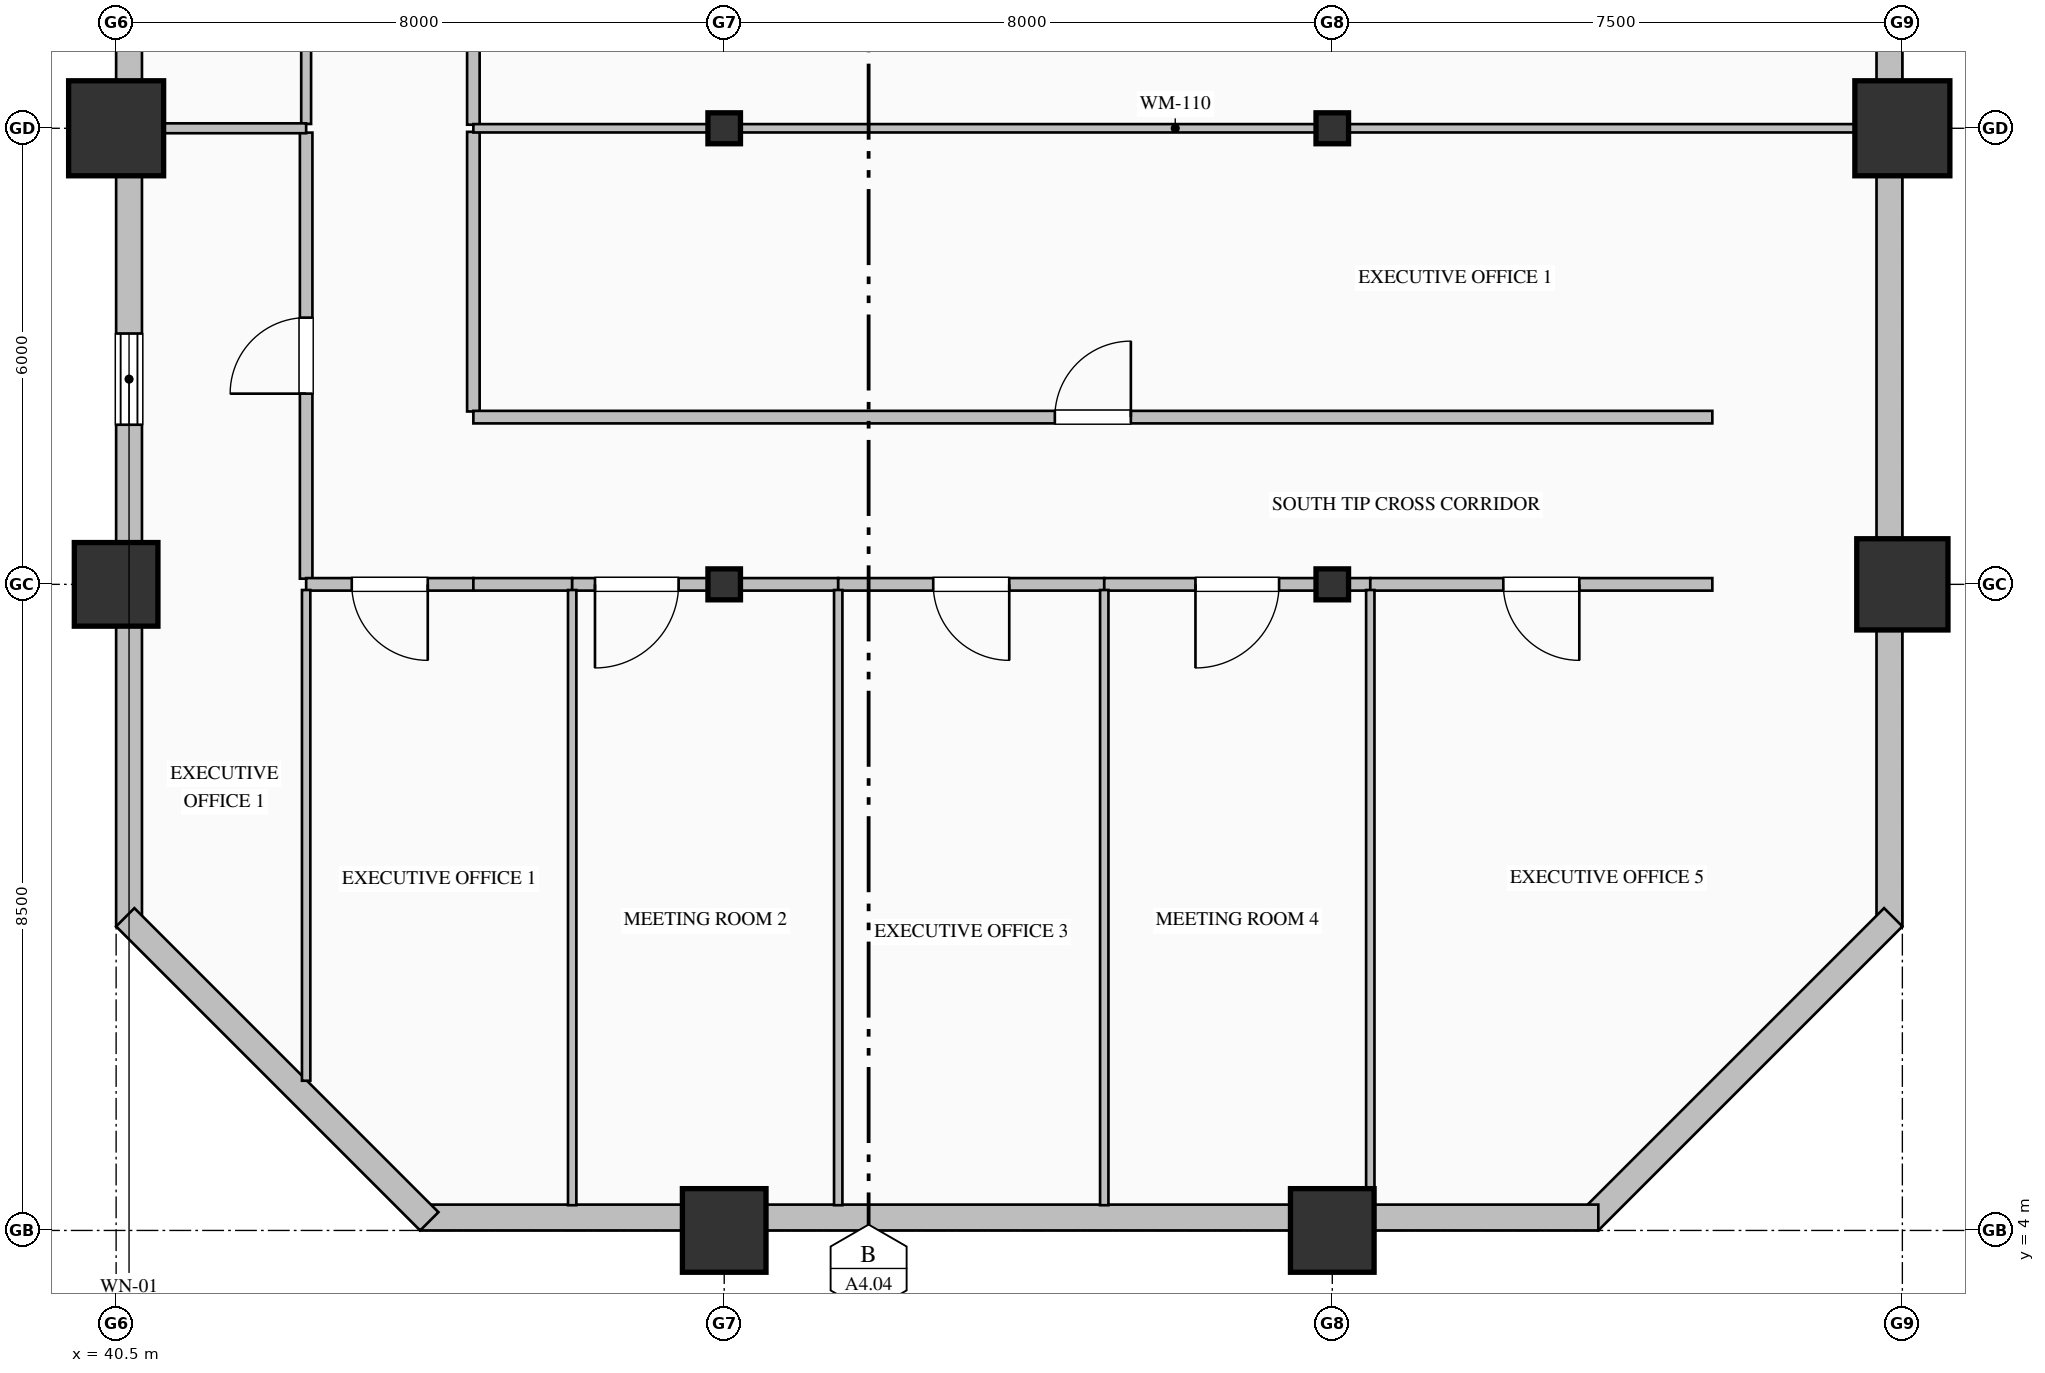
"""IFC4 building model, lengths in metres.
Left out: names, types, materials, properties, quantities, classifications, styles, units other than length and angle.
Written with IfcOpenShell. Run it as: python <this file> out.ifc"""

import sys

from ifc_helpers import new_model, si_unit, direction, frame, frame_2d, origin, origin_2d, place, context, subcontext, project, spatial, rectangle, hollow_rectangle, hollow_circle, i_section, extrude, element, fill, save


model = new_model("IFC4")
c1 = context("Model", 3, precision=1e-05, world=origin(), true_north=direction((0.0, 1.0)))
c2 = subcontext(c1, "Body", "Model", "MODEL_VIEW")
j1 = project(units=[si_unit("LENGTHUNIT", "METRE"), si_unit("PLANEANGLEUNIT", "RADIAN")], contexts=[c1])
p1 = place(None, origin())
s1 = spatial("IfcSite", under=j1, at=p1, CompositionType="ELEMENT")
p2 = place(p1, origin())
s2 = spatial("IfcBuilding", under=s1, at=p2, CompositionType="ELEMENT")
p3 = place(p2, frame((0.0, 0.0, 40.2)))
s3 = spatial("IfcBuildingStorey", under=s2, at=p3, CompositionType="ELEMENT", Elevation=40.2)
p4 = place(p3, frame((40.5, 12.5, 0.0), z_axis=(0.0, 0.0, 1.0), x_axis=(1.0, 0.0, 0.0)))
e1 = element("IfcColumn", 1, at=p4, inside=s3, PredefinedType="COLUMN", context=c2, shape_type="SweptSolid", body=[
    extrude(hollow_rectangle(XDim=1.1, YDim=1.1, WallThickness=0.04, at=origin_2d()), origin(), (0.0, 0.0, 1.0), 4.0),
])
p5 = place(p3, frame((40.5, 18.5, 0.0), z_axis=(0.0, 0.0, 1.0), x_axis=(1.0, 0.0, 0.0)))
e2 = element("IfcColumn", 2, at=p5, inside=s3, PredefinedType="COLUMN", context=c2, shape_type="SweptSolid", body=[
    extrude(hollow_rectangle(XDim=1.25, YDim=1.25, WallThickness=0.045, at=origin_2d()), origin(), (0.0, 0.0, 1.0), 4.0),
])
p6 = place(p3, frame((48.5, 4.0, 0.0), z_axis=(0.0, 0.0, 1.0), x_axis=(1.0, 0.0, 0.0)))
e3 = element("IfcColumn", 3, at=p6, inside=s3, PredefinedType="COLUMN", context=c2, shape_type="SweptSolid", body=[
    extrude(hollow_rectangle(XDim=1.1, YDim=1.1, WallThickness=0.04, at=origin_2d()), origin(), (0.0, 0.0, 1.0), 4.0),
])
for number, where, z_axis, x_axis in (
    (4, (48.5, 12.5, 0.0), (0.0, 0.0, 1.0), (1.0, 0.0, 0.0)),
    (5, (48.5, 18.5, 0.0), (0.0, 0.0, 1.0), (1.0, 0.0, 0.0)),
):
    element("IfcColumn", number, at=place(p3, frame(where, z_axis=z_axis, x_axis=x_axis)), inside=s3, PredefinedType="COLUMN", context=c2, shape_type="SweptSolid", body=[
        extrude(i_section(OverallWidth=0.407, OverallDepth=0.428, WebThickness=0.02, FlangeThickness=0.035, FilletRadius=0.022, at=origin_2d()), origin(), (0.0, 0.0, 1.0), 4.0),
    ])
p7 = place(p3, frame((56.5, 4.0, 0.0), z_axis=(0.0, 0.0, 1.0), x_axis=(1.0, 0.0, 0.0)))
e6 = element("IfcColumn", 6, at=p7, inside=s3, PredefinedType="COLUMN", context=c2, shape_type="SweptSolid", body=[
    extrude(hollow_rectangle(XDim=1.1, YDim=1.1, WallThickness=0.04, at=origin_2d()), origin(), (0.0, 0.0, 1.0), 4.0),
])
for number, where, z_axis, x_axis in (
    (7, (56.5, 12.5, 0.0), (0.0, 0.0, 1.0), (1.0, 0.0, 0.0)),
    (8, (56.5, 18.5, 0.0), (0.0, 0.0, 1.0), (1.0, 0.0, 0.0)),
):
    element("IfcColumn", number, at=place(p3, frame(where, z_axis=z_axis, x_axis=x_axis)), inside=s3, PredefinedType="COLUMN", context=c2, shape_type="SweptSolid", body=[
        extrude(i_section(OverallWidth=0.407, OverallDepth=0.428, WebThickness=0.02, FlangeThickness=0.035, FilletRadius=0.022, at=origin_2d()), origin(), (0.0, 0.0, 1.0), 4.0),
    ])
p8 = place(p3, frame((64.0, 12.5, 0.0), z_axis=(0.0, 0.0, 1.0), x_axis=(1.0, 0.0, 0.0)))
e9 = element("IfcColumn", 9, at=p8, inside=s3, PredefinedType="COLUMN", context=c2, shape_type="SweptSolid", body=[
    extrude(hollow_circle(Radius=0.6, WallThickness=0.04, at=origin_2d()), origin(), (0.0, 0.0, 1.0), 4.0),
])
p9 = place(p3, frame((64.0, 18.5, 0.0), z_axis=(0.0, 0.0, 1.0), x_axis=(1.0, 0.0, 0.0)))
e10 = element("IfcColumn", 10, at=p9, inside=s3, PredefinedType="COLUMN", context=c2, shape_type="SweptSolid", body=[
    extrude(hollow_rectangle(XDim=1.25, YDim=1.25, WallThickness=0.045, at=origin_2d()), origin(), (0.0, 0.0, 1.0), 4.0),
])
p10 = place(p3, frame((40.67, 8.0, 0.0), z_axis=(0.0, 0.0, 1.0), x_axis=(0.0, 1.0, 0.0)))
e11 = element("IfcWall", 11, at=p10, inside=s3, PredefinedType="SOLIDWALL", context=c2, shape_type="SweptSolid", body=[
    extrude(rectangle(XDim=20.34, YDim=0.34, at=frame_2d((10.17, 0.0))), origin(), (0.0, 0.0, 1.0), 3.05),
])
p11 = place(p10, frame((6.6, 0.0, 0.7)))
e12 = element("IfcOpeningElement", 12, at=p11, cuts=e11, PredefinedType="OPENING", context=c2, shape_type="SweptSolid", body=[
    extrude(rectangle(XDim=1.2, YDim=1.85, at=frame_2d((0.6, 0.925))), frame((0.0, 0.18, 0.0), z_axis=(0.0, -1.0, 0.0), x_axis=(1.0, 0.0, 0.0)), (0.0, 0.0, 1.0), 0.36),
])
p12 = place(p10, frame((13.8, 0.0, 0.7)))
e13 = element("IfcOpeningElement", 13, at=p12, cuts=e11, PredefinedType="OPENING", context=c2, shape_type="SweptSolid", body=[
    extrude(rectangle(XDim=1.2, YDim=1.85, at=frame_2d((0.6, 0.925))), frame((0.0, 0.18, 0.0), z_axis=(0.0, -1.0, 0.0), x_axis=(1.0, 0.0, 0.0)), (0.0, 0.0, 1.0), 0.36),
])
p13 = place(p3, frame((63.83, 36.05, 0.0), z_axis=(0.0, 0.0, 1.0), x_axis=(0.0, -1.0, 0.0)))
e14 = element("IfcWall", 14, at=p13, inside=s3, PredefinedType="SOLIDWALL", context=c2, shape_type="SweptSolid", body=[
    extrude(rectangle(XDim=28.05, YDim=0.34, at=frame_2d((14.025, 0.0))), origin(), (0.0, 0.0, 1.0), 3.25),
])
p14 = place(p13, frame((9.6, 0.0, 0.8)))
e15 = element("IfcOpeningElement", 15, at=p14, cuts=e14, PredefinedType="OPENING", context=c2, shape_type="SweptSolid", body=[
    extrude(rectangle(XDim=2.4, YDim=2.15, at=frame_2d((1.2, 1.075))), frame((0.0, 0.18, 0.0), z_axis=(0.0, -1.0, 0.0), x_axis=(1.0, 0.0, 0.0)), (0.0, 0.0, 1.0), 0.36),
])
p15 = place(p13, frame((13.5, 0.0, 0.85)))
e16 = element("IfcOpeningElement", 16, at=p15, cuts=e14, PredefinedType="OPENING", context=c2, shape_type="SweptSolid", body=[
    extrude(rectangle(XDim=1.8, YDim=2.05, at=frame_2d((0.9, 1.025))), frame((0.0, 0.18, 0.0), z_axis=(0.0, -1.0, 0.0), x_axis=(1.0, 0.0, 0.0)), (0.0, 0.0, 1.0), 0.36),
])
p16 = place(p3, frame((63.88, 8.12, 0.0), z_axis=(0.0, 0.0, 1.0), x_axis=(-0.707106781187, -0.707106781187, 0.0)))
e17 = element("IfcWall", 17, at=p16, inside=s3, PredefinedType="SOLIDWALL", context=c2, shape_type="SweptSolid", body=[
    extrude(rectangle(XDim=5.657, YDim=0.34, at=frame_2d((2.828, 0.0))), origin(), (0.0, 0.0, 1.0), 3.75),
])
p17 = place(p3, frame((60.0, 4.17, 0.0), z_axis=(0.0, 0.0, 1.0), x_axis=(-1.0, 0.0, 0.0)))
e18 = element("IfcWall", 18, at=p17, inside=s3, PredefinedType="SOLIDWALL", context=c2, shape_type="SweptSolid", body=[
    extrude(rectangle(XDim=15.5, YDim=0.34, at=frame_2d((7.75, 0.0))), origin(), (0.0, 0.0, 1.0), 3.25),
])
p18 = place(p3, frame((44.62, 4.12, 0.0), z_axis=(0.0, 0.0, 1.0), x_axis=(-0.707106781187, 0.707106781187, 0.0)))
e19 = element("IfcWall", 19, at=p18, inside=s3, PredefinedType="SOLIDWALL", context=c2, shape_type="SweptSolid", body=[
    extrude(rectangle(XDim=5.657, YDim=0.34, at=frame_2d((2.828, 0.0))), origin(), (0.0, 0.0, 1.0), 3.75),
])
p19 = place(p3, frame((45.2, 18.453, 0.0), z_axis=(0.0, 0.0, 1.0), x_axis=(0.0, -1.0, 0.0)))
e20 = element("IfcWall", 20, at=p19, inside=s3, PredefinedType="PARTITIONING", context=c2, shape_type="SweptSolid", body=[
    extrude(rectangle(XDim=3.678, YDim=0.165, at=frame_2d((1.839, 0.0))), origin(), (0.0, 0.0, 1.0), 3.75),
])
p20 = place(p3, frame((45.2, 23.153, 0.0), z_axis=(0.0, 0.0, 1.0), x_axis=(0.0, -1.0, 0.0)))
e21 = element("IfcWall", 21, at=p20, inside=s3, PredefinedType="PARTITIONING", context=c2, shape_type="SweptSolid", body=[
    extrude(rectangle(XDim=4.606, YDim=0.165, at=frame_2d((2.303, 0.0))), origin(), (0.0, 0.0, 1.0), 3.75),
])
p21 = place(p20, frame((1.753, 0.0, 0.0)))
e22 = element("IfcOpeningElement", 22, at=p21, cuts=e21, PredefinedType="OPENING", context=c2, shape_type="SweptSolid", body=[
    extrude(rectangle(XDim=1.1, YDim=2.2, at=frame_2d((0.55, 1.1))), frame((0.0, 0.093, 0.0), z_axis=(0.0, -1.0, 0.0), x_axis=(1.0, 0.0, 0.0)), (0.0, 0.0, 1.0), 0.185),
])
p22 = place(p3, frame((43.0, 12.574, 0.0), z_axis=(0.0, 0.0, 1.0), x_axis=(0.0, 1.0, 0.0)))
e23 = element("IfcWall", 23, at=p22, inside=s3, PredefinedType="PARTITIONING", context=c2, shape_type="SweptSolid", body=[
    extrude(rectangle(XDim=5.869, YDim=0.165, at=frame_2d((2.934, 0.0))), origin(), (0.0, 0.0, 1.0), 3.75),
])
p23 = place(p22, frame((2.434, 0.0, 0.0)))
e24 = element("IfcOpeningElement", 24, at=p23, cuts=e23, PredefinedType="OPENING", context=c2, shape_type="SweptSolid", body=[
    extrude(rectangle(XDim=1.0, YDim=2.15, at=frame_2d((0.5, 1.075))), frame((0.0, 0.093, 0.0), z_axis=(0.0, -1.0, 0.0), x_axis=(1.0, 0.0, 0.0)), (0.0, 0.0, 1.0), 0.185),
])
p24 = place(p3, frame((43.0, 18.557, 0.0), z_axis=(0.0, 0.0, 1.0), x_axis=(0.0, 1.0, 0.0)))
e25 = element("IfcWall", 25, at=p24, inside=s3, PredefinedType="PARTITIONING", context=c2, shape_type="SweptSolid", body=[
    extrude(rectangle(XDim=5.886, YDim=0.13, at=frame_2d((2.943, 0.0))), origin(), (0.0, 0.0, 1.0), 3.75),
])
p25 = place(p24, frame((2.443, 0.0, 0.0)))
e26 = element("IfcOpeningElement", 26, at=p25, cuts=e25, PredefinedType="OPENING", context=c2, shape_type="SweptSolid", body=[
    extrude(rectangle(XDim=1.0, YDim=2.15, at=frame_2d((0.5, 1.075))), frame((0.0, 0.075, 0.0), z_axis=(0.0, -1.0, 0.0), x_axis=(1.0, 0.0, 0.0)), (0.0, 0.0, 1.0), 0.15),
])
p26 = place(p3, frame((45.2, 12.5, 0.0), z_axis=(0.0, 0.0, 1.0), x_axis=(-1.0, 0.0, 0.0)))
e27 = element("IfcWall", 27, at=p26, inside=s3, PredefinedType="PARTITIONING", context=c2, shape_type="SweptSolid", body=[
    extrude(rectangle(XDim=2.2, YDim=0.165, at=frame_2d((1.1, 0.0))), origin(), (0.0, 0.0, 1.0), 3.042),
])
p27 = place(p26, frame((0.6, 0.0, 0.0)))
e28 = element("IfcOpeningElement", 28, at=p27, cuts=e27, PredefinedType="OPENING", context=c2, shape_type="SweptSolid", body=[
    extrude(rectangle(XDim=1.0, YDim=2.15, at=frame_2d((0.5, 1.075))), frame((0.0, 0.093, 0.0), z_axis=(0.0, -1.0, 0.0), x_axis=(1.0, 0.0, 0.0)), (0.0, 0.0, 1.0), 0.185),
])
p28 = place(p3, frame((45.2, 14.7, 0.0), z_axis=(0.0, 0.0, 1.0), x_axis=(1.0, 0.0, 0.0)))
e29 = element("IfcWall", 29, at=p28, inside=s3, PredefinedType="PARTITIONING", context=c2, shape_type="SweptSolid", body=[
    extrude(rectangle(XDim=16.3, YDim=0.165, at=frame_2d((8.15, 0.0))), origin(), (0.0, 0.0, 1.0), 3.75),
])
p29 = place(p28, frame((7.65, 0.0, 0.0)))
e30 = element("IfcOpeningElement", 30, at=p29, cuts=e29, PredefinedType="OPENING", context=c2, shape_type="SweptSolid", body=[
    extrude(rectangle(XDim=1.0, YDim=2.15, at=frame_2d((0.5, 1.075))), frame((0.0, 0.093, 0.0), z_axis=(0.0, -1.0, 0.0), x_axis=(1.0, 0.0, 0.0)), (0.0, 0.0, 1.0), 0.185),
])
p30 = place(p3, frame((46.5, 12.5, 0.0), z_axis=(0.0, 0.0, 1.0), x_axis=(-1.0, 0.0, 0.0)))
e31 = element("IfcWall", 31, at=p30, inside=s3, PredefinedType="PARTITIONING", context=c2, shape_type="SweptSolid", body=[
    extrude(rectangle(XDim=1.3, YDim=0.165, at=frame_2d((0.65, 0.0))), origin(), (0.0, 0.0, 1.0), 3.042),
])
p31 = place(p3, frame((50.0, 12.5, 0.0), z_axis=(0.0, 0.0, 1.0), x_axis=(-1.0, 0.0, 0.0)))
e32 = element("IfcWall", 32, at=p31, inside=s3, PredefinedType="PARTITIONING", context=c2, shape_type="SweptSolid", body=[
    extrude(rectangle(XDim=3.5, YDim=0.165, at=frame_2d((1.75, 0.0))), origin(), (0.0, 0.0, 1.0), 3.042),
])
p32 = place(p31, frame((2.1, 0.0, 0.0)))
e33 = element("IfcOpeningElement", 33, at=p32, cuts=e32, PredefinedType="OPENING", context=c2, shape_type="SweptSolid", body=[
    extrude(rectangle(XDim=1.1, YDim=2.2, at=frame_2d((0.55, 1.1))), frame((0.0, 0.093, 0.0), z_axis=(0.0, -1.0, 0.0), x_axis=(1.0, 0.0, 0.0)), (0.0, 0.0, 1.0), 0.185),
])
p33 = place(p3, frame((53.5, 12.5, 0.0), z_axis=(0.0, 0.0, 1.0), x_axis=(-1.0, 0.0, 0.0)))
e34 = element("IfcWall", 34, at=p33, inside=s3, PredefinedType="PARTITIONING", context=c2, shape_type="SweptSolid", body=[
    extrude(rectangle(XDim=3.5, YDim=0.165, at=frame_2d((1.75, 0.0))), origin(), (0.0, 0.0, 1.0), 3.042),
])
p34 = place(p33, frame((1.25, 0.0, 0.0)))
e35 = element("IfcOpeningElement", 35, at=p34, cuts=e34, PredefinedType="OPENING", context=c2, shape_type="SweptSolid", body=[
    extrude(rectangle(XDim=1.0, YDim=2.15, at=frame_2d((0.5, 1.075))), frame((0.0, 0.093, 0.0), z_axis=(0.0, -1.0, 0.0), x_axis=(1.0, 0.0, 0.0)), (0.0, 0.0, 1.0), 0.185),
])
p35 = place(p3, frame((57.0, 12.5, 0.0), z_axis=(0.0, 0.0, 1.0), x_axis=(-1.0, 0.0, 0.0)))
e36 = element("IfcWall", 36, at=p35, inside=s3, PredefinedType="PARTITIONING", context=c2, shape_type="SweptSolid", body=[
    extrude(rectangle(XDim=3.5, YDim=0.165, at=frame_2d((1.75, 0.0))), origin(), (0.0, 0.0, 1.0), 3.042),
])
p36 = place(p35, frame((1.2, 0.0, 0.0)))
e37 = element("IfcOpeningElement", 37, at=p36, cuts=e36, PredefinedType="OPENING", context=c2, shape_type="SweptSolid", body=[
    extrude(rectangle(XDim=1.1, YDim=2.2, at=frame_2d((0.55, 1.1))), frame((0.0, 0.093, 0.0), z_axis=(0.0, -1.0, 0.0), x_axis=(1.0, 0.0, 0.0)), (0.0, 0.0, 1.0), 0.185),
])
p37 = place(p3, frame((61.5, 12.5, 0.0), z_axis=(0.0, 0.0, 1.0), x_axis=(-1.0, 0.0, 0.0)))
e38 = element("IfcWall", 38, at=p37, inside=s3, PredefinedType="PARTITIONING", context=c2, shape_type="SweptSolid", body=[
    extrude(rectangle(XDim=4.5, YDim=0.165, at=frame_2d((2.25, 0.0))), origin(), (0.0, 0.0, 1.0), 3.042),
])
p38 = place(p37, frame((1.75, 0.0, 0.0)))
e39 = element("IfcOpeningElement", 39, at=p38, cuts=e38, PredefinedType="OPENING", context=c2, shape_type="SweptSolid", body=[
    extrude(rectangle(XDim=1.0, YDim=2.15, at=frame_2d((0.5, 1.075))), frame((0.0, 0.093, 0.0), z_axis=(0.0, -1.0, 0.0), x_axis=(1.0, 0.0, 0.0)), (0.0, 0.0, 1.0), 0.185),
])
p39 = place(p3, frame((45.2, 18.5, 0.0), z_axis=(0.0, 0.0, 1.0), x_axis=(1.0, 0.0, 0.0)))
e40 = element("IfcWall", 40, at=p39, inside=s3, PredefinedType="MOVABLE", context=c2, shape_type="SweptSolid", body=[
    extrude(rectangle(XDim=18.468, YDim=0.11, at=frame_2d((9.234, 0.0))), origin(), (0.0, 0.0, 1.0), 3.042),
])
p40 = place(p3, frame((40.832, 18.5, 0.0), z_axis=(0.0, 0.0, 1.0), x_axis=(1.0, 0.0, 0.0)))
e41 = element("IfcWall", 41, at=p40, inside=s3, PredefinedType="PARTITIONING", context=c2, shape_type="SweptSolid", body=[
    extrude(rectangle(XDim=2.168, YDim=0.13, at=frame_2d((1.084, 0.0))), origin(), (0.0, 0.0, 1.0), 3.042),
])
p41 = place(p3, frame((43.0, 12.426, 0.0), z_axis=(0.0, 0.0, 1.0), x_axis=(0.0, -1.0, 0.0)))
e42 = element("IfcWall", 42, at=p41, inside=s3, PredefinedType="MOVABLE", context=c2, shape_type="SweptSolid", body=[
    extrude(rectangle(XDim=6.456, YDim=0.11, at=frame_2d((3.228, 0.0))), origin(), (0.0, 0.0, 1.0), 3.75),
])
for number, where, z_axis, x_axis in (
    (43, (46.5, 12.426, 0.0), (0.0, 0.0, 1.0), (0.0, -1.0, 0.0)),
    (44, (50.0, 12.426, 0.0), (0.0, 0.0, 1.0), (0.0, -1.0, 0.0)),
    (45, (53.5, 12.426, 0.0), (0.0, 0.0, 1.0), (0.0, -1.0, 0.0)),
    (46, (57.0, 12.426, 0.0), (0.0, 0.0, 1.0), (0.0, -1.0, 0.0)),
):
    element("IfcWall", number, at=place(p3, frame(where, z_axis=z_axis, x_axis=x_axis)), inside=s3, PredefinedType="MOVABLE", context=c2, shape_type="SweptSolid", body=[
        extrude(rectangle(XDim=8.094, YDim=0.11, at=frame_2d((4.047, 0.0))), origin(), (0.0, 0.0, 1.0), 3.75),
    ])
p42 = place(p11, origin())
e47 = element("IfcWindow", 47, at=p42, inside=s3, PartitioningType="DOUBLE_PANEL_VERTICAL", PredefinedType="WINDOW", context=c2, shape_type="SweptSolid", body=[
    extrude(rectangle(XDim=1.2, YDim=1.85, at=frame_2d((0.6, 0.925))), frame((0.0, 0.15, 0.0), z_axis=(0.0, -1.0, 0.0), x_axis=(1.0, 0.0, 0.0)), (0.0, 0.0, 1.0), 0.06),
])
fill(e12, e47)
p43 = place(p29, origin())
e48 = element("IfcDoor", 48, at=p43, inside=s3, OperationType="SINGLE_SWING_RIGHT", PredefinedType="DOOR", context=c2, shape_type="SweptSolid", body=[
    extrude(rectangle(XDim=1.0, YDim=2.15, at=frame_2d((0.5, 1.075))), frame((0.0, 0.025, 0.0), z_axis=(0.0, -1.0, 0.0), x_axis=(1.0, 0.0, 0.0)), (0.0, 0.0, 1.0), 0.05),
])
fill(e30, e48)
p44 = place(p23, origin())
e49 = element("IfcDoor", 49, at=p44, inside=s3, OperationType="SINGLE_SWING_LEFT", PredefinedType="DOOR", context=c2, shape_type="SweptSolid", body=[
    extrude(rectangle(XDim=1.0, YDim=2.15, at=frame_2d((0.5, 1.075))), frame((0.0, 0.025, 0.0), z_axis=(0.0, -1.0, 0.0), x_axis=(1.0, 0.0, 0.0)), (0.0, 0.0, 1.0), 0.05),
])
fill(e24, e49)
p45 = place(p27, origin())
e50 = element("IfcDoor", 50, at=p45, inside=s3, OperationType="SINGLE_SWING_LEFT", PredefinedType="DOOR", context=c2, shape_type="SweptSolid", body=[
    extrude(rectangle(XDim=1.0, YDim=2.15, at=frame_2d((0.5, 1.075))), frame((0.0, 0.025, 0.0), z_axis=(0.0, -1.0, 0.0), x_axis=(1.0, 0.0, 0.0)), (0.0, 0.0, 1.0), 0.05),
])
fill(e28, e50)
p46 = place(p32, origin())
e51 = element("IfcDoor", 51, at=p46, inside=s3, OperationType="SINGLE_SWING_RIGHT", PredefinedType="DOOR", context=c2, shape_type="SweptSolid", body=[
    extrude(rectangle(XDim=1.1, YDim=2.2, at=frame_2d((0.55, 1.1))), frame((0.0, 0.025, 0.0), z_axis=(0.0, -1.0, 0.0), x_axis=(1.0, 0.0, 0.0)), (0.0, 0.0, 1.0), 0.05),
])
fill(e33, e51)
p47 = place(p34, origin())
e52 = element("IfcDoor", 52, at=p47, inside=s3, OperationType="SINGLE_SWING_LEFT", PredefinedType="DOOR", context=c2, shape_type="SweptSolid", body=[
    extrude(rectangle(XDim=1.0, YDim=2.15, at=frame_2d((0.5, 1.075))), frame((0.0, 0.025, 0.0), z_axis=(0.0, -1.0, 0.0), x_axis=(1.0, 0.0, 0.0)), (0.0, 0.0, 1.0), 0.05),
])
fill(e35, e52)
p48 = place(p36, origin())
e53 = element("IfcDoor", 53, at=p48, inside=s3, OperationType="SINGLE_SWING_RIGHT", PredefinedType="DOOR", context=c2, shape_type="SweptSolid", body=[
    extrude(rectangle(XDim=1.1, YDim=2.2, at=frame_2d((0.55, 1.1))), frame((0.0, 0.025, 0.0), z_axis=(0.0, -1.0, 0.0), x_axis=(1.0, 0.0, 0.0)), (0.0, 0.0, 1.0), 0.05),
])
fill(e37, e53)
p49 = place(p38, origin())
e54 = element("IfcDoor", 54, at=p49, inside=s3, OperationType="SINGLE_SWING_LEFT", PredefinedType="DOOR", context=c2, shape_type="SweptSolid", body=[
    extrude(rectangle(XDim=1.0, YDim=2.15, at=frame_2d((0.5, 1.075))), frame((0.0, 0.025, 0.0), z_axis=(0.0, -1.0, 0.0), x_axis=(1.0, 0.0, 0.0)), (0.0, 0.0, 1.0), 0.05),
])
fill(e39, e54)
save(model, sys.argv[1])
